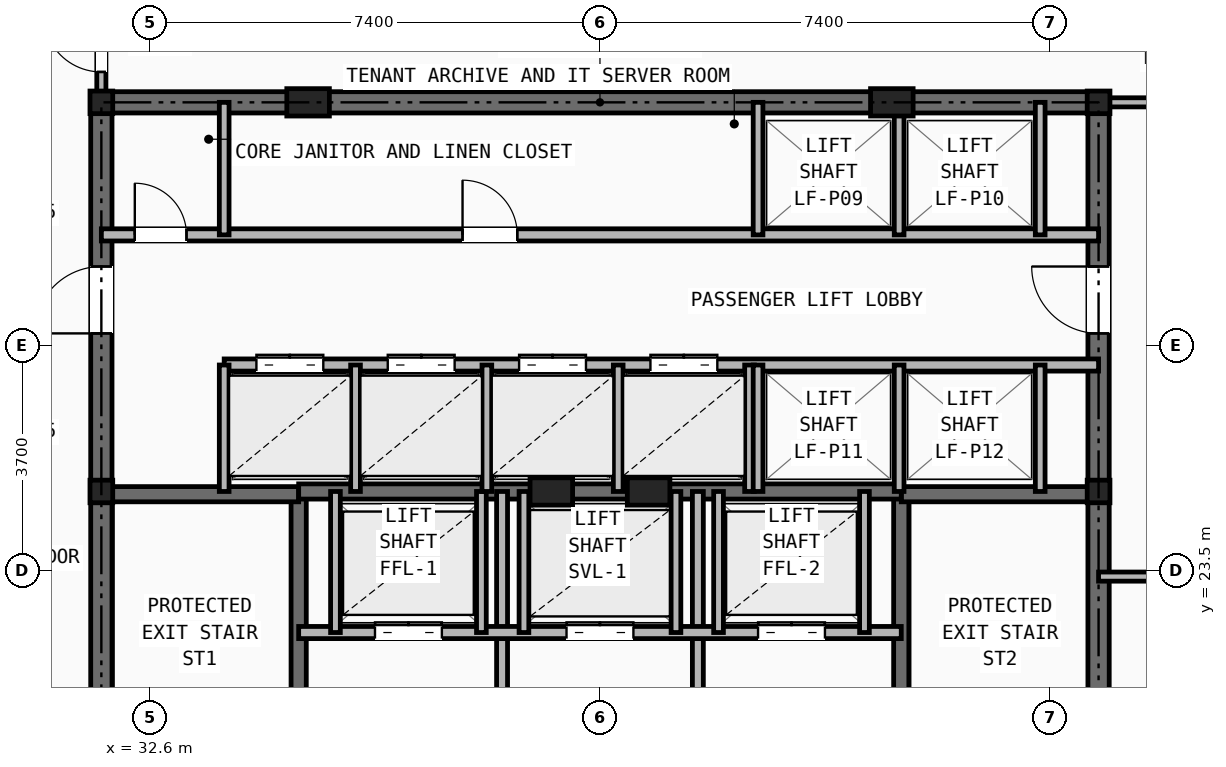
"""IFC4 building model, lengths in metres.
Left out: names, types, materials, properties, quantities, classifications, styles, units other than length and angle.
Written with IfcOpenShell. Run it as: python <this file> out.ifc"""

import sys

from ifc_helpers import new_model, si_unit, direction, frame, frame_2d, origin, origin_2d, place, context, subcontext, project, spatial, rectangle, i_section, extrude, element, fill, save


model = new_model("IFC4")
c1 = context("Model", 3, precision=1e-05, world=origin(), true_north=direction((0.0, 1.0)))
c2 = subcontext(c1, "Body", "Model", "MODEL_VIEW")
j1 = project(units=[si_unit("LENGTHUNIT", "METRE"), si_unit("PLANEANGLEUNIT", "RADIAN")], contexts=[c1])
p1 = place(None, origin())
s1 = spatial("IfcSite", under=j1, at=p1, CompositionType="ELEMENT")
p2 = place(p1, origin())
s2 = spatial("IfcBuilding", under=s1, at=p2, CompositionType="ELEMENT")
p3 = place(p2, frame((0.0, 0.0, 129.8)))
s3 = spatial("IfcBuildingStorey", under=s2, at=p3, CompositionType="ELEMENT", Elevation=129.8)
for number, where, z_axis, x_axis in (
    (1, (31.8, 24.8, 0.0), (0.0, 0.0, 1.0), (1.0, 0.0, 0.0)),
    (2, (48.2, 24.8, 0.0), (0.0, 0.0, 1.0), (1.0, 0.0, 0.0)),
    (3, (31.8, 31.2, 0.0), (0.0, 0.0, 1.0), (1.0, 0.0, 0.0)),
    (4, (48.2, 31.2, 0.0), (0.0, 0.0, 1.0), (1.0, 0.0, 0.0)),
):
    element("IfcColumn", number, at=place(p3, frame(where, z_axis=z_axis, x_axis=x_axis)), inside=s3, PredefinedType="COLUMN", context=c2, shape_type="SweptSolid", body=[
        extrude(i_section(OverallWidth=0.374, OverallDepth=0.372, WebThickness=0.016, FlangeThickness=0.026, at=origin_2d()), origin(), (0.0, 0.0, 1.0), 3.45),
    ])
for number, where, z_axis, x_axis in (
    (5, (35.2, 31.2, 0.0), (0.0, 0.0, 1.0), (1.0, 0.0, 0.0)),
    (6, (44.8, 31.2, 0.0), (0.0, 0.0, 1.0), (1.0, 0.0, 0.0)),
    (7, (39.2, 24.8, 0.0), (0.0, 0.0, 1.0), (1.0, 0.0, 0.0)),
    (8, (40.8, 24.8, 0.0), (0.0, 0.0, 1.0), (1.0, 0.0, 0.0)),
):
    element("IfcColumn", number, at=place(p3, frame(where, z_axis=z_axis, x_axis=x_axis)), inside=s3, PredefinedType="PILASTER", context=c2, shape_type="SweptSolid", body=[
        extrude(rectangle(XDim=0.7, YDim=0.45, at=origin_2d()), origin(), (0.0, 0.0, 1.0), 3.45),
    ])
p4 = place(p3, frame((31.8, 31.2, 0.0), z_axis=(0.0, 0.0, 1.0), x_axis=(1.0, 0.0, 0.0)))
e9 = element("IfcWall", 9, at=p4, inside=s3, PredefinedType="SHEAR", context=c2, shape_type="SweptSolid", body=[
    extrude(rectangle(XDim=16.4, YDim=0.35, at=frame_2d((8.2, 0.0))), origin(), (0.0, 0.0, 1.0), 3.21),
])
p5 = place(p3, frame((31.8, 16.4, 0.0), z_axis=(0.0, 0.0, 1.0), x_axis=(0.0, 1.0, 0.0)))
e10 = element("IfcWall", 10, at=p5, inside=s3, PredefinedType="SHEAR", context=c2, shape_type="SweptSolid", body=[
    extrude(rectangle(XDim=14.8, YDim=0.35, at=frame_2d((7.4, 0.0))), origin(), (0.0, 0.0, 1.0), 3.21),
])
p6 = place(p5, frame((11.0, 0.0, 0.0)))
e11 = element("IfcOpeningElement", 11, at=p6, cuts=e10, PredefinedType="OPENING", context=c2, shape_type="SweptSolid", body=[
    extrude(rectangle(XDim=1.1, YDim=2.15, at=frame_2d((0.55, 1.075))), frame((0.0, 0.185, 0.0), z_axis=(0.0, -1.0, 0.0), x_axis=(1.0, 0.0, 0.0)), (0.0, 0.0, 1.0), 0.37),
])
p7 = place(p3, frame((48.2, 16.4, 0.0), z_axis=(0.0, 0.0, 1.0), x_axis=(0.0, 1.0, 0.0)))
e12 = element("IfcWall", 12, at=p7, inside=s3, PredefinedType="SHEAR", context=c2, shape_type="SweptSolid", body=[
    extrude(rectangle(XDim=14.8, YDim=0.35, at=frame_2d((7.4, 0.0))), origin(), (0.0, 0.0, 1.0), 3.21),
])
p8 = place(p7, frame((11.0, 0.0, 0.0)))
e13 = element("IfcOpeningElement", 13, at=p8, cuts=e12, PredefinedType="OPENING", context=c2, shape_type="SweptSolid", body=[
    extrude(rectangle(XDim=1.1, YDim=2.15, at=frame_2d((0.55, 1.075))), frame((0.0, 0.185, 0.0), z_axis=(0.0, -1.0, 0.0), x_axis=(1.0, 0.0, 0.0)), (0.0, 0.0, 1.0), 0.37),
])
p9 = place(p3, frame((35.045, 16.4, 0.0), z_axis=(0.0, 0.0, 1.0), x_axis=(0.0, 1.0, 0.0)))
e14 = element("IfcWall", 14, at=p9, inside=s3, PredefinedType="SHEAR", context=c2, shape_type="SweptSolid", body=[
    extrude(rectangle(XDim=8.4, YDim=0.25, at=frame_2d((4.2, 0.0))), origin(), (0.0, 0.0, 1.0), 3.21),
])
p10 = place(p9, frame((0.45, 0.0, 0.0)))
e15 = element("IfcOpeningElement", 15, at=p10, cuts=e14, PredefinedType="OPENING", context=c2, shape_type="SweptSolid", body=[
    extrude(rectangle(XDim=0.95, YDim=2.1, at=frame_2d((0.475, 1.05))), frame((0.0, 0.135, 0.0), z_axis=(0.0, -1.0, 0.0), x_axis=(1.0, 0.0, 0.0)), (0.0, 0.0, 1.0), 0.27),
])
p11 = place(p3, frame((31.8, 24.755, 0.0), z_axis=(0.0, 0.0, 1.0), x_axis=(1.0, 0.0, 0.0)))
e16 = element("IfcWall", 16, at=p11, inside=s3, PredefinedType="SHEAR", context=c2, shape_type="SweptSolid", body=[
    extrude(rectangle(XDim=3.245, YDim=0.25, at=frame_2d((1.623, 0.0))), origin(), (0.0, 0.0, 1.0), 3.21),
])
p12 = place(p3, frame((44.955, 16.4, 0.0), z_axis=(0.0, 0.0, 1.0), x_axis=(0.0, 1.0, 0.0)))
e17 = element("IfcWall", 17, at=p12, inside=s3, PredefinedType="SHEAR", context=c2, shape_type="SweptSolid", body=[
    extrude(rectangle(XDim=8.4, YDim=0.25, at=frame_2d((4.2, 0.0))), origin(), (0.0, 0.0, 1.0), 3.21),
])
p13 = place(p12, frame((0.45, 0.0, 0.0)))
e18 = element("IfcOpeningElement", 18, at=p13, cuts=e17, PredefinedType="OPENING", context=c2, shape_type="SweptSolid", body=[
    extrude(rectangle(XDim=0.95, YDim=2.1, at=frame_2d((0.475, 1.05))), frame((0.0, 0.135, 0.0), z_axis=(0.0, -1.0, 0.0), x_axis=(1.0, 0.0, 0.0)), (0.0, 0.0, 1.0), 0.27),
])
p14 = place(p3, frame((44.955, 24.755, 0.0), z_axis=(0.0, 0.0, 1.0), x_axis=(1.0, 0.0, 0.0)))
e19 = element("IfcWall", 19, at=p14, inside=s3, PredefinedType="SHEAR", context=c2, shape_type="SweptSolid", body=[
    extrude(rectangle(XDim=3.245, YDim=0.25, at=frame_2d((1.623, 0.0))), origin(), (0.0, 0.0, 1.0), 3.21),
])
p15 = place(p3, frame((35.045, 24.8, 0.0), z_axis=(0.0, 0.0, 1.0), x_axis=(1.0, 0.0, 0.0)))
e20 = element("IfcWall", 20, at=p15, inside=s3, PredefinedType="SHEAR", context=c2, shape_type="SweptSolid", body=[
    extrude(rectangle(XDim=9.91, YDim=0.25, at=frame_2d((4.955, 0.0))), origin(), (0.0, 0.0, 1.0), 3.21),
])
p16 = place(p3, frame((38.39, 16.4, 0.0), z_axis=(0.0, 0.0, 1.0), x_axis=(0.0, 1.0, 0.0)))
e21 = element("IfcWall", 21, at=p16, inside=s3, PredefinedType="PARTITIONING", context=c2, shape_type="SweptSolid", body=[
    extrude(rectangle(XDim=8.4, YDim=0.18, at=frame_2d((4.2, 0.0))), origin(), (0.0, 0.0, 1.0), 2.661),
])
p17 = place(p16, frame((3.8, 0.0, 0.0)))
e22 = element("IfcOpeningElement", 22, at=p17, cuts=e21, PredefinedType="OPENING", context=c2, shape_type="SweptSolid", body=[
    extrude(rectangle(XDim=0.95, YDim=2.1, at=frame_2d((0.475, 1.05))), frame((0.0, 0.1, 0.0), z_axis=(0.0, -1.0, 0.0), x_axis=(1.0, 0.0, 0.0)), (0.0, 0.0, 1.0), 0.2),
])
p18 = place(p3, frame((41.61, 16.4, 0.0), z_axis=(0.0, 0.0, 1.0), x_axis=(0.0, 1.0, 0.0)))
e23 = element("IfcWall", 23, at=p18, inside=s3, PredefinedType="PARTITIONING", context=c2, shape_type="SweptSolid", body=[
    extrude(rectangle(XDim=8.4, YDim=0.18, at=frame_2d((4.2, 0.0))), origin(), (0.0, 0.0, 1.0), 2.661),
])
p19 = place(p3, frame((35.045, 22.48, 0.0), z_axis=(0.0, 0.0, 1.0), x_axis=(1.0, 0.0, 0.0)))
e24 = element("IfcWall", 24, at=p19, inside=s3, PredefinedType="SOLIDWALL", context=c2, shape_type="SweptSolid", body=[
    extrude(rectangle(XDim=9.91, YDim=0.2, at=frame_2d((4.955, 0.0))), origin(), (0.0, 0.0, 1.0), 3.21),
])
p20 = place(p19, frame((1.255, 0.0, 0.0)))
e25 = element("IfcOpeningElement", 25, at=p20, cuts=e24, PredefinedType="OPENING", context=c2, shape_type="SweptSolid", body=[
    extrude(rectangle(XDim=1.1, YDim=2.15, at=frame_2d((0.55, 1.075))), frame((0.0, 0.11, 0.0), z_axis=(0.0, -1.0, 0.0), x_axis=(1.0, 0.0, 0.0)), (0.0, 0.0, 1.0), 0.22),
])
p21 = place(p19, frame((7.555, 0.0, 0.0)))
e26 = element("IfcOpeningElement", 26, at=p21, cuts=e24, PredefinedType="OPENING", context=c2, shape_type="SweptSolid", body=[
    extrude(rectangle(XDim=1.1, YDim=2.15, at=frame_2d((0.55, 1.075))), frame((0.0, 0.11, 0.0), z_axis=(0.0, -1.0, 0.0), x_axis=(1.0, 0.0, 0.0)), (0.0, 0.0, 1.0), 0.22),
])
p22 = place(p19, frame((4.405, 0.0, 0.0)))
e27 = element("IfcOpeningElement", 27, at=p22, cuts=e24, PredefinedType="OPENING", context=c2, shape_type="SweptSolid", body=[
    extrude(rectangle(XDim=1.1, YDim=2.15, at=frame_2d((0.55, 1.075))), frame((0.0, 0.11, 0.0), z_axis=(0.0, -1.0, 0.0), x_axis=(1.0, 0.0, 0.0)), (0.0, 0.0, 1.0), 0.22),
])
for number, where, z_axis, x_axis in (
    (28, (35.65, 22.48, 0.0), (0.0, 0.0, 1.0), (0.0, 1.0, 0.0)),
    (29, (38.05, 22.48, 0.0), (0.0, 0.0, 1.0), (0.0, 1.0, 0.0)),
    (30, (41.95, 22.48, 0.0), (0.0, 0.0, 1.0), (0.0, 1.0, 0.0)),
    (31, (44.35, 22.48, 0.0), (0.0, 0.0, 1.0), (0.0, 1.0, 0.0)),
    (32, (38.75, 22.48, 0.0), (0.0, 0.0, 1.0), (0.0, 1.0, 0.0)),
    (33, (41.25, 22.48, 0.0), (0.0, 0.0, 1.0), (0.0, 1.0, 0.0)),
):
    element("IfcWall", number, at=place(p3, frame(where, z_axis=z_axis, x_axis=x_axis)), inside=s3, PredefinedType="SOLIDWALL", context=c2, shape_type="SweptSolid", body=[
        extrude(rectangle(XDim=2.32, YDim=0.16, at=frame_2d((1.16, 0.0))), origin(), (0.0, 0.0, 1.0), 3.21),
    ])
p23 = place(p3, frame((31.8, 29.02, 0.0), z_axis=(0.0, 0.0, 1.0), x_axis=(1.0, 0.0, 0.0)))
e34 = element("IfcWall", 34, at=p23, inside=s3, PredefinedType="SOLIDWALL", context=c2, shape_type="SweptSolid", body=[
    extrude(rectangle(XDim=16.4, YDim=0.2, at=frame_2d((8.2, 0.0))), origin(), (0.0, 0.0, 1.0), 2.661),
])
p24 = place(p23, frame((0.55, 0.0, 0.0)))
e35 = element("IfcOpeningElement", 35, at=p24, cuts=e34, PredefinedType="OPENING", context=c2, shape_type="SweptSolid", body=[
    extrude(rectangle(XDim=0.85, YDim=2.05, at=frame_2d((0.425, 1.025))), frame((0.0, 0.11, 0.0), z_axis=(0.0, -1.0, 0.0), x_axis=(1.0, 0.0, 0.0)), (0.0, 0.0, 1.0), 0.22),
])
p25 = place(p23, frame((5.94, 0.0, 0.0)))
e36 = element("IfcOpeningElement", 36, at=p25, cuts=e34, PredefinedType="OPENING", context=c2, shape_type="SweptSolid", body=[
    extrude(rectangle(XDim=0.9, YDim=2.1, at=frame_2d((0.45, 1.05))), frame((0.0, 0.11, 0.0), z_axis=(0.0, -1.0, 0.0), x_axis=(1.0, 0.0, 0.0)), (0.0, 0.0, 1.0), 0.22),
])
p26 = place(p3, frame((33.82, 26.88, 0.0), z_axis=(0.0, 0.0, 1.0), x_axis=(1.0, 0.0, 0.0)))
e37 = element("IfcWall", 37, at=p26, inside=s3, PredefinedType="SOLIDWALL", context=c2, shape_type="SweptSolid", body=[
    extrude(rectangle(XDim=14.38, YDim=0.2, at=frame_2d((7.19, 0.0))), origin(), (0.0, 0.0, 1.0), 2.661),
])
p27 = place(p26, frame((0.53, 0.0, 0.0)))
e38 = element("IfcOpeningElement", 38, at=p27, cuts=e37, PredefinedType="OPENING", context=c2, shape_type="SweptSolid", body=[
    extrude(rectangle(XDim=1.1, YDim=2.15, at=frame_2d((0.55, 1.075))), frame((0.0, 0.11, 0.0), z_axis=(0.0, -1.0, 0.0), x_axis=(1.0, 0.0, 0.0)), (0.0, 0.0, 1.0), 0.22),
])
p28 = place(p26, frame((2.69, 0.0, 0.0)))
e39 = element("IfcOpeningElement", 39, at=p28, cuts=e37, PredefinedType="OPENING", context=c2, shape_type="SweptSolid", body=[
    extrude(rectangle(XDim=1.1, YDim=2.15, at=frame_2d((0.55, 1.075))), frame((0.0, 0.11, 0.0), z_axis=(0.0, -1.0, 0.0), x_axis=(1.0, 0.0, 0.0)), (0.0, 0.0, 1.0), 0.22),
])
p29 = place(p26, frame((4.85, 0.0, 0.0)))
e40 = element("IfcOpeningElement", 40, at=p29, cuts=e37, PredefinedType="OPENING", context=c2, shape_type="SweptSolid", body=[
    extrude(rectangle(XDim=1.1, YDim=2.15, at=frame_2d((0.55, 1.075))), frame((0.0, 0.11, 0.0), z_axis=(0.0, -1.0, 0.0), x_axis=(1.0, 0.0, 0.0)), (0.0, 0.0, 1.0), 0.22),
])
p30 = place(p26, frame((7.01, 0.0, 0.0)))
e41 = element("IfcOpeningElement", 41, at=p30, cuts=e37, PredefinedType="OPENING", context=c2, shape_type="SweptSolid", body=[
    extrude(rectangle(XDim=1.1, YDim=2.15, at=frame_2d((0.55, 1.075))), frame((0.0, 0.11, 0.0), z_axis=(0.0, -1.0, 0.0), x_axis=(1.0, 0.0, 0.0)), (0.0, 0.0, 1.0), 0.22),
])
p31 = place(p3, frame((33.82, 29.02, 0.0), z_axis=(0.0, 0.0, 1.0), x_axis=(0.0, 1.0, 0.0)))
e42 = element("IfcWall", 42, at=p31, inside=s3, PredefinedType="SOLIDWALL", context=c2, shape_type="SweptSolid", body=[
    extrude(rectangle(XDim=2.18, YDim=0.16, at=frame_2d((1.09, 0.0))), origin(), (0.0, 0.0, 1.0), 2.661),
])
for number, where, z_axis, x_axis in (
    (43, (33.82, 24.8, 0.0), (0.0, 0.0, 1.0), (0.0, 1.0, 0.0)),
    (44, (35.98, 24.8, 0.0), (0.0, 0.0, 1.0), (0.0, 1.0, 0.0)),
    (45, (38.14, 24.8, 0.0), (0.0, 0.0, 1.0), (0.0, 1.0, 0.0)),
    (46, (40.3, 24.8, 0.0), (0.0, 0.0, 1.0), (0.0, 1.0, 0.0)),
    (47, (42.46, 24.8, 0.0), (0.0, 0.0, 1.0), (0.0, 1.0, 0.0)),
):
    element("IfcWall", number, at=place(p3, frame(where, z_axis=z_axis, x_axis=x_axis)), inside=s3, PredefinedType="SOLIDWALL", context=c2, shape_type="SweptSolid", body=[
        extrude(rectangle(XDim=2.08, YDim=0.16, at=frame_2d((1.04, 0.0))), origin(), (0.0, 0.0, 1.0), 3.21),
    ])
for number, where, z_axis, x_axis in (
    (48, (42.6, 29.02, 0.0), (0.0, 0.0, 1.0), (0.0, 1.0, 0.0)),
    (49, (44.92, 29.02, 0.0), (0.0, 0.0, 1.0), (0.0, 1.0, 0.0)),
    (50, (47.24, 29.02, 0.0), (0.0, 0.0, 1.0), (0.0, 1.0, 0.0)),
):
    element("IfcWall", number, at=place(p3, frame(where, z_axis=z_axis, x_axis=x_axis)), inside=s3, PredefinedType="SOLIDWALL", context=c2, shape_type="SweptSolid", body=[
        extrude(rectangle(XDim=2.18, YDim=0.16, at=frame_2d((1.09, 0.0))), origin(), (0.0, 0.0, 1.0), 2.661),
    ])
for number, where, z_axis, x_axis in (
    (51, (42.6, 24.8, 0.0), (0.0, 0.0, 1.0), (0.0, 1.0, 0.0)),
    (52, (44.92, 24.8, 0.0), (0.0, 0.0, 1.0), (0.0, 1.0, 0.0)),
    (53, (47.24, 24.8, 0.0), (0.0, 0.0, 1.0), (0.0, 1.0, 0.0)),
):
    element("IfcWall", number, at=place(p3, frame(where, z_axis=z_axis, x_axis=x_axis)), inside=s3, PredefinedType="SOLIDWALL", context=c2, shape_type="SweptSolid", body=[
        extrude(rectangle(XDim=2.08, YDim=0.16, at=frame_2d((1.04, 0.0))), origin(), (0.0, 0.0, 1.0), 3.21),
    ])
p32 = place(p3, frame((31.8, 31.2, 0.0), z_axis=(0.0, 0.0, 1.0), x_axis=(0.0, 1.0, 0.0)))
e54 = element("IfcWall", 54, at=p32, inside=s3, PredefinedType="PARTITIONING", context=c2, shape_type="SweptSolid", body=[
    extrude(rectangle(XDim=5.3, YDim=0.15, at=frame_2d((2.65, 0.0))), origin(), (0.0, 0.0, 1.0), 2.252),
])
p33 = place(p32, frame((0.5, 0.0, 0.0)))
e55 = element("IfcOpeningElement", 55, at=p33, cuts=e54, PredefinedType="OPENING", context=c2, shape_type="SweptSolid", body=[
    extrude(rectangle(XDim=0.95, YDim=2.1, at=frame_2d((0.475, 1.05))), frame((0.0, 0.085, 0.0), z_axis=(0.0, -1.0, 0.0), x_axis=(1.0, 0.0, 0.0)), (0.0, 0.0, 1.0), 0.17),
])
p34 = place(p32, frame((2.9, 0.0, 0.0)))
e56 = element("IfcOpeningElement", 56, at=p34, cuts=e54, PredefinedType="OPENING", context=c2, shape_type="SweptSolid", body=[
    extrude(rectangle(XDim=0.95, YDim=2.1, at=frame_2d((0.475, 1.05))), frame((0.0, 0.085, 0.0), z_axis=(0.0, -1.0, 0.0), x_axis=(1.0, 0.0, 0.0)), (0.0, 0.0, 1.0), 0.17),
])
p35 = place(p3, frame((48.2, 31.2, 0.0), z_axis=(0.0, 0.0, 1.0), x_axis=(1.0, 0.0, 0.0)))
e57 = element("IfcWall", 57, at=p35, inside=s3, PredefinedType="PARTITIONING", context=c2, shape_type="SweptSolid", body=[
    extrude(rectangle(XDim=8.65, YDim=0.15, at=frame_2d((4.325, 0.0))), origin(), (0.0, 0.0, 1.0), 2.252),
])
p36 = place(p3, frame((48.2, 23.4, 0.0), z_axis=(0.0, 0.0, 1.0), x_axis=(1.0, 0.0, 0.0)))
e58 = element("IfcWall", 58, at=p36, inside=s3, PredefinedType="PARTITIONING", context=c2, shape_type="SweptSolid", body=[
    extrude(rectangle(XDim=13.225, YDim=0.15, at=frame_2d((6.612, 0.0))), origin(), (0.0, 0.0, 1.0), 2.589),
])
p37 = place(p36, frame((1.4, 0.0, 0.0)))
e59 = element("IfcOpeningElement", 59, at=p37, cuts=e58, PredefinedType="OPENING", context=c2, shape_type="SweptSolid", body=[
    extrude(rectangle(XDim=0.95, YDim=2.1, at=frame_2d((0.475, 1.05))), frame((0.0, 0.085, 0.0), z_axis=(0.0, -1.0, 0.0), x_axis=(1.0, 0.0, 0.0)), (0.0, 0.0, 1.0), 0.17),
])
p38 = place(p20, origin())
e60 = element("IfcDoor", 60, at=p38, inside=s3, OperationType="DOUBLE_DOOR_SLIDING", PredefinedType="DOOR", context=c2, shape_type="SweptSolid", body=[
    extrude(rectangle(XDim=1.1, YDim=2.15, at=frame_2d((0.55, 1.075))), frame((0.0, 0.025, 0.0), z_axis=(0.0, -1.0, 0.0), x_axis=(1.0, 0.0, 0.0)), (0.0, 0.0, 1.0), 0.05),
])
fill(e25, e60)
p39 = place(p21, origin())
e61 = element("IfcDoor", 61, at=p39, inside=s3, OperationType="DOUBLE_DOOR_SLIDING", PredefinedType="DOOR", context=c2, shape_type="SweptSolid", body=[
    extrude(rectangle(XDim=1.1, YDim=2.15, at=frame_2d((0.55, 1.075))), frame((0.0, 0.025, 0.0), z_axis=(0.0, -1.0, 0.0), x_axis=(1.0, 0.0, 0.0)), (0.0, 0.0, 1.0), 0.05),
])
fill(e26, e61)
p40 = place(p22, origin())
e62 = element("IfcDoor", 62, at=p40, inside=s3, OperationType="DOUBLE_DOOR_SLIDING", PredefinedType="DOOR", context=c2, shape_type="SweptSolid", body=[
    extrude(rectangle(XDim=1.1, YDim=2.15, at=frame_2d((0.55, 1.075))), frame((0.0, 0.025, 0.0), z_axis=(0.0, -1.0, 0.0), x_axis=(1.0, 0.0, 0.0)), (0.0, 0.0, 1.0), 0.05),
])
fill(e27, e62)
p41 = place(p24, origin())
e63 = element("IfcDoor", 63, at=p41, inside=s3, OperationType="SINGLE_SWING_LEFT", PredefinedType="DOOR", context=c2, shape_type="SweptSolid", body=[
    extrude(rectangle(XDim=0.85, YDim=2.05, at=frame_2d((0.425, 1.025))), frame((0.0, 0.025, 0.0), z_axis=(0.0, -1.0, 0.0), x_axis=(1.0, 0.0, 0.0)), (0.0, 0.0, 1.0), 0.05),
])
fill(e35, e63)
p42 = place(p6, origin())
e64 = element("IfcDoor", 64, at=p42, inside=s3, OperationType="SINGLE_SWING_LEFT", PredefinedType="DOOR", context=c2, shape_type="SweptSolid", body=[
    extrude(rectangle(XDim=1.1, YDim=2.15, at=frame_2d((0.55, 1.075))), frame((0.0, 0.025, 0.0), z_axis=(0.0, -1.0, 0.0), x_axis=(1.0, 0.0, 0.0)), (0.0, 0.0, 1.0), 0.05),
])
fill(e11, e64)
p43 = place(p8, origin())
e65 = element("IfcDoor", 65, at=p43, inside=s3, OperationType="SINGLE_SWING_RIGHT", PredefinedType="DOOR", context=c2, shape_type="SweptSolid", body=[
    extrude(rectangle(XDim=1.1, YDim=2.15, at=frame_2d((0.55, 1.075))), frame((0.0, 0.025, 0.0), z_axis=(0.0, -1.0, 0.0), x_axis=(1.0, 0.0, 0.0)), (0.0, 0.0, 1.0), 0.05),
])
fill(e13, e65)
p44 = place(p25, origin())
e66 = element("IfcDoor", 66, at=p44, inside=s3, OperationType="SINGLE_SWING_LEFT", PredefinedType="DOOR", context=c2, shape_type="SweptSolid", body=[
    extrude(rectangle(XDim=0.9, YDim=2.1, at=frame_2d((0.45, 1.05))), frame((0.0, 0.025, 0.0), z_axis=(0.0, -1.0, 0.0), x_axis=(1.0, 0.0, 0.0)), (0.0, 0.0, 1.0), 0.05),
])
fill(e36, e66)
p45 = place(p27, origin())
e67 = element("IfcDoor", 67, at=p45, inside=s3, OperationType="DOUBLE_DOOR_SLIDING", PredefinedType="DOOR", context=c2, shape_type="SweptSolid", body=[
    extrude(rectangle(XDim=1.1, YDim=2.15, at=frame_2d((0.55, 1.075))), frame((0.0, 0.025, 0.0), z_axis=(0.0, -1.0, 0.0), x_axis=(1.0, 0.0, 0.0)), (0.0, 0.0, 1.0), 0.05),
])
fill(e38, e67)
p46 = place(p28, origin())
e68 = element("IfcDoor", 68, at=p46, inside=s3, OperationType="DOUBLE_DOOR_SLIDING", PredefinedType="DOOR", context=c2, shape_type="SweptSolid", body=[
    extrude(rectangle(XDim=1.1, YDim=2.15, at=frame_2d((0.55, 1.075))), frame((0.0, 0.025, 0.0), z_axis=(0.0, -1.0, 0.0), x_axis=(1.0, 0.0, 0.0)), (0.0, 0.0, 1.0), 0.05),
])
fill(e39, e68)
p47 = place(p29, origin())
e69 = element("IfcDoor", 69, at=p47, inside=s3, OperationType="DOUBLE_DOOR_SLIDING", PredefinedType="DOOR", context=c2, shape_type="SweptSolid", body=[
    extrude(rectangle(XDim=1.1, YDim=2.15, at=frame_2d((0.55, 1.075))), frame((0.0, 0.025, 0.0), z_axis=(0.0, -1.0, 0.0), x_axis=(1.0, 0.0, 0.0)), (0.0, 0.0, 1.0), 0.05),
])
fill(e40, e69)
p48 = place(p30, origin())
e70 = element("IfcDoor", 70, at=p48, inside=s3, OperationType="DOUBLE_DOOR_SLIDING", PredefinedType="DOOR", context=c2, shape_type="SweptSolid", body=[
    extrude(rectangle(XDim=1.1, YDim=2.15, at=frame_2d((0.55, 1.075))), frame((0.0, 0.025, 0.0), z_axis=(0.0, -1.0, 0.0), x_axis=(1.0, 0.0, 0.0)), (0.0, 0.0, 1.0), 0.05),
])
fill(e41, e70)
p49 = place(p33, origin())
e71 = element("IfcDoor", 71, at=p49, inside=s3, OperationType="SINGLE_SWING_RIGHT", PredefinedType="DOOR", context=c2, shape_type="SweptSolid", body=[
    extrude(rectangle(XDim=0.95, YDim=2.1, at=frame_2d((0.475, 1.05))), frame((0.0, 0.025, 0.0), z_axis=(0.0, -1.0, 0.0), x_axis=(1.0, 0.0, 0.0)), (0.0, 0.0, 1.0), 0.05),
])
fill(e55, e71)
save(model, sys.argv[1])
